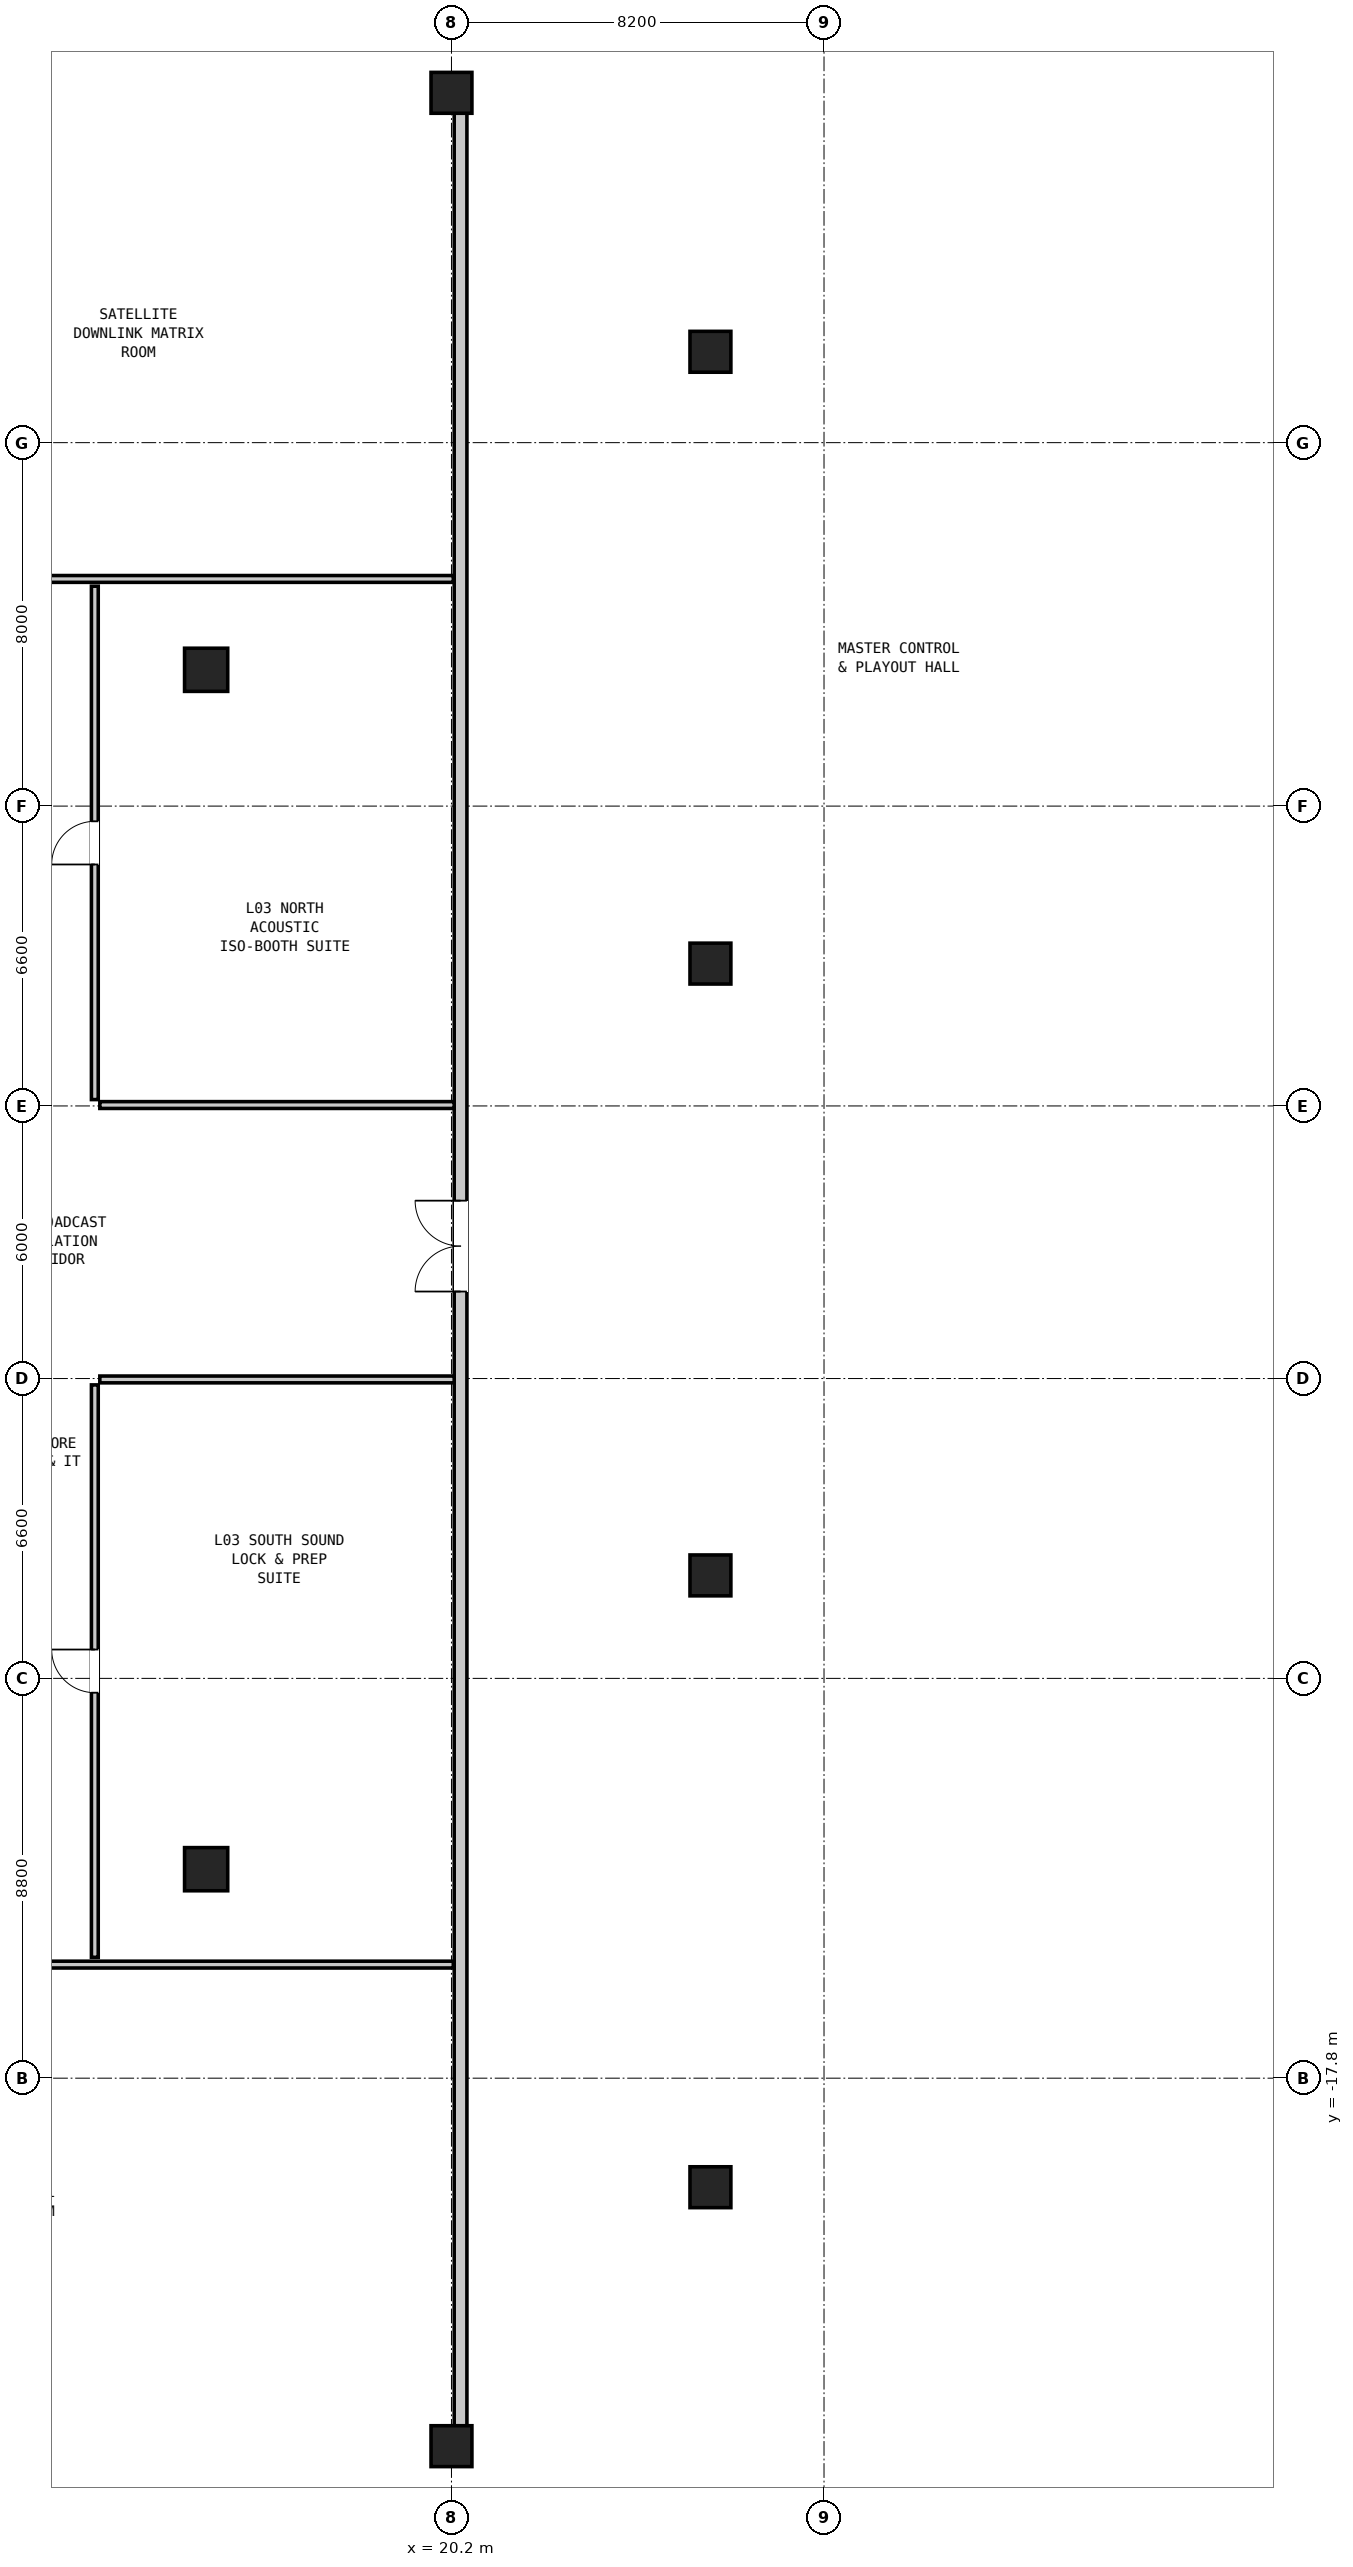
"""IFC4 building model, lengths in metres.
Left out: names, types, materials, properties, quantities, classifications, styles, units other than length and angle.
Written with IfcOpenShell. Run it as: python <this file> out.ifc"""

import sys

from ifc_helpers import new_model, si_unit, direction, frame, frame_2d, origin, origin_2d, place, context, subcontext, project, spatial, rectangle, hollow_rectangle, extrude, element, fill, save


model = new_model("IFC4")
c1 = context("Model", 3, precision=1e-05, world=origin(), true_north=direction((0.0, 1.0)))
c2 = subcontext(c1, "Body", "Model", "MODEL_VIEW")
j1 = project(units=[si_unit("LENGTHUNIT", "METRE"), si_unit("PLANEANGLEUNIT", "RADIAN")], contexts=[c1])
p1 = place(None, origin())
s1 = spatial("IfcSite", under=j1, at=p1, CompositionType="ELEMENT")
p2 = place(p1, origin())
s2 = spatial("IfcBuilding", under=s1, at=p2, CompositionType="ELEMENT")
p3 = place(p2, frame((0.0, 0.0, 13.5)))
s3 = spatial("IfcBuildingStorey", under=s2, at=p3, CompositionType="ELEMENT", Elevation=13.5)
for number, where, z_axis, x_axis in (
    (1, (14.8, -13.2, 0.0), (0.0, 0.0, 1.0), (1.0, 0.0, 0.0)),
    (2, (14.8, 13.2, 0.0), (0.0, 0.0, 1.0), (1.0, 0.0, 0.0)),
):
    element("IfcColumn", number, at=place(p3, frame(where, z_axis=z_axis, x_axis=x_axis)), inside=s3, PredefinedType="COLUMN", context=c2, shape_type="SweptSolid", body=[
        extrude(hollow_rectangle(XDim=0.95, YDim=0.95, WallThickness=0.06, at=origin_2d()), origin(), (0.0, 0.0, 1.0), 4.2),
    ])
for number, where, z_axis, x_axis in (
    (3, (20.2, -25.9, 0.0), (0.0, 0.0, 1.0), (1.0, 0.0, 0.0)),
    (4, (25.9, -20.2, 0.0), (0.0, 0.0, 1.0), (0.0, 1.0, 0.0)),
    (5, (25.9, -6.733, 0.0), (0.0, 0.0, 1.0), (0.0, 1.0, 0.0)),
    (6, (25.9, 6.733, 0.0), (0.0, 0.0, 1.0), (0.0, 1.0, 0.0)),
    (7, (25.9, 20.2, 0.0), (0.0, 0.0, 1.0), (0.0, 1.0, 0.0)),
    (8, (20.2, 25.9, 0.0), (0.0, 0.0, 1.0), (1.0, 0.0, 0.0)),
):
    element("IfcColumn", number, at=place(p3, frame(where, z_axis=z_axis, x_axis=x_axis)), inside=s3, PredefinedType="COLUMN", context=c2, shape_type="SweptSolid", body=[
        extrude(hollow_rectangle(XDim=0.9, YDim=0.9, WallThickness=0.055, at=origin_2d()), origin(), (0.0, 0.0, 1.0), 4.2),
    ])
p4 = place(p3, frame((20.4, -25.74, 0.0), z_axis=(0.0, 0.0, 1.0), x_axis=(0.0, 1.0, 0.0)))
e9 = element("IfcWall", 9, at=p4, inside=s3, PredefinedType="MOVABLE", context=c2, shape_type="SweptSolid", body=[
    extrude(rectangle(XDim=51.48, YDim=0.28, at=frame_2d((25.74, 0.0))), origin(), (0.0, 0.0, 1.0), 3.253),
])
p5 = place(p4, frame((25.255, 0.0, 0.0)))
e10 = element("IfcOpeningElement", 10, at=p5, cuts=e9, PredefinedType="OPENING", context=c2, shape_type="SweptSolid", body=[
    extrude(rectangle(XDim=2.0, YDim=2.14, at=frame_2d((1.0, 1.07))), frame((0.0, 0.152, 0.0), z_axis=(0.0, -1.0, 0.0), x_axis=(1.0, 0.0, 0.0)), (0.0, 0.0, 1.0), 0.304),
])
p6 = place(p3, frame((-4.64, 15.2, 0.0), z_axis=(0.0, 0.0, 1.0), x_axis=(1.0, 0.0, 0.0)))
e11 = element("IfcWall", 11, at=p6, inside=s3, PredefinedType="PARTITIONING", context=c2, shape_type="SweptSolid", body=[
    extrude(rectangle(XDim=24.88, YDim=0.15, at=frame_2d((12.44, 0.0))), origin(), (0.0, 0.0, 1.0), 3.88),
])
p7 = place(p6, frame((5.62, 0.0, 0.0)))
e12 = element("IfcOpeningElement", 12, at=p7, cuts=e11, PredefinedType="OPENING", context=c2, shape_type="SweptSolid", body=[
    extrude(rectangle(XDim=1.2, YDim=2.1, at=frame_2d((0.6, 1.05))), frame((0.0, 0.087, 0.0), z_axis=(0.0, -1.0, 0.0), x_axis=(1.0, 0.0, 0.0)), (0.0, 0.0, 1.0), 0.174),
])
p8 = place(p3, frame((-4.64, -15.3, 0.0), z_axis=(0.0, 0.0, 1.0), x_axis=(1.0, 0.0, 0.0)))
e13 = element("IfcWall", 13, at=p8, inside=s3, PredefinedType="PARTITIONING", context=c2, shape_type="SweptSolid", body=[
    extrude(rectangle(XDim=24.88, YDim=0.15, at=frame_2d((12.44, 0.0))), origin(), (0.0, 0.0, 1.0), 3.88),
])
p9 = place(p8, frame((5.62, 0.0, 0.0)))
e14 = element("IfcOpeningElement", 14, at=p9, cuts=e13, PredefinedType="OPENING", context=c2, shape_type="SweptSolid", body=[
    extrude(rectangle(XDim=1.2, YDim=2.1, at=frame_2d((0.6, 1.05))), frame((0.0, 0.087, 0.0), z_axis=(0.0, -1.0, 0.0), x_axis=(1.0, 0.0, 0.0)), (0.0, 0.0, 1.0), 0.174),
])
p10 = place(p3, frame((12.35, -15.14, 0.0), z_axis=(0.0, 0.0, 1.0), x_axis=(0.0, 1.0, 0.0)))
e15 = element("IfcWall", 15, at=p10, inside=s3, PredefinedType="PARTITIONING", context=c2, shape_type="SweptSolid", body=[
    extrude(rectangle(XDim=12.6, YDim=0.15, at=frame_2d((6.3, 0.0))), origin(), (0.0, 0.0, 1.0), 3.88),
])
p11 = place(p10, frame((5.825, 0.0, 0.0)))
e16 = element("IfcOpeningElement", 16, at=p11, cuts=e15, PredefinedType="OPENING", context=c2, shape_type="SweptSolid", body=[
    extrude(rectangle(XDim=0.95, YDim=2.1, at=frame_2d((0.475, 1.05))), frame((0.0, 0.087, 0.0), z_axis=(0.0, -1.0, 0.0), x_axis=(1.0, 0.0, 0.0)), (0.0, 0.0, 1.0), 0.174),
])
p12 = place(p3, frame((12.35, 3.74, 0.0), z_axis=(0.0, 0.0, 1.0), x_axis=(0.0, 1.0, 0.0)))
e17 = element("IfcWall", 17, at=p12, inside=s3, PredefinedType="PARTITIONING", context=c2, shape_type="SweptSolid", body=[
    extrude(rectangle(XDim=11.3, YDim=0.15, at=frame_2d((5.65, 0.0))), origin(), (0.0, 0.0, 1.0), 3.88),
])
p13 = place(p12, frame((5.175, 0.0, 0.0)))
e18 = element("IfcOpeningElement", 18, at=p13, cuts=e17, PredefinedType="OPENING", context=c2, shape_type="SweptSolid", body=[
    extrude(rectangle(XDim=0.95, YDim=2.1, at=frame_2d((0.475, 1.05))), frame((0.0, 0.087, 0.0), z_axis=(0.0, -1.0, 0.0), x_axis=(1.0, 0.0, 0.0)), (0.0, 0.0, 1.0), 0.174),
])
for number, where, z_axis, x_axis in (
    (19, (12.46, -2.42, 0.0), (0.0, 0.0, 1.0), (1.0, 0.0, 0.0)),
    (20, (12.46, 3.62, 0.0), (0.0, 0.0, 1.0), (1.0, 0.0, 0.0)),
):
    element("IfcWall", number, at=place(p3, frame(where, z_axis=z_axis, x_axis=x_axis)), inside=s3, PredefinedType="PARTITIONING", context=c2, shape_type="SweptSolid", body=[
        extrude(rectangle(XDim=7.8, YDim=0.15, at=frame_2d((3.9, 0.0))), origin(), (0.0, 0.0, 1.0), 2.742),
    ])
p14 = place(p5, origin())
e21 = element("IfcDoor", 21, at=p14, inside=s3, OperationType="DOUBLE_DOOR_SINGLE_SWING", PredefinedType="DOOR", context=c2, shape_type="SweptSolid", body=[
    extrude(rectangle(XDim=2.0, YDim=2.14, at=frame_2d((1.0, 1.07))), frame((0.0, 0.025, 0.0), z_axis=(0.0, -1.0, 0.0), x_axis=(1.0, 0.0, 0.0)), (0.0, 0.0, 1.0), 0.05),
])
fill(e10, e21)
p15 = place(p11, origin())
e22 = element("IfcDoor", 22, at=p15, inside=s3, OperationType="SINGLE_SWING_RIGHT", PredefinedType="DOOR", context=c2, shape_type="SweptSolid", body=[
    extrude(rectangle(XDim=0.95, YDim=2.1, at=frame_2d((0.475, 1.05))), frame((0.0, 0.025, 0.0), z_axis=(0.0, -1.0, 0.0), x_axis=(1.0, 0.0, 0.0)), (0.0, 0.0, 1.0), 0.05),
])
fill(e16, e22)
p16 = place(p13, origin())
e23 = element("IfcDoor", 23, at=p16, inside=s3, OperationType="SINGLE_SWING_LEFT", PredefinedType="DOOR", context=c2, shape_type="SweptSolid", body=[
    extrude(rectangle(XDim=0.95, YDim=2.1, at=frame_2d((0.475, 1.05))), frame((0.0, 0.025, 0.0), z_axis=(0.0, -1.0, 0.0), x_axis=(1.0, 0.0, 0.0)), (0.0, 0.0, 1.0), 0.05),
])
fill(e18, e23)
save(model, sys.argv[1])
